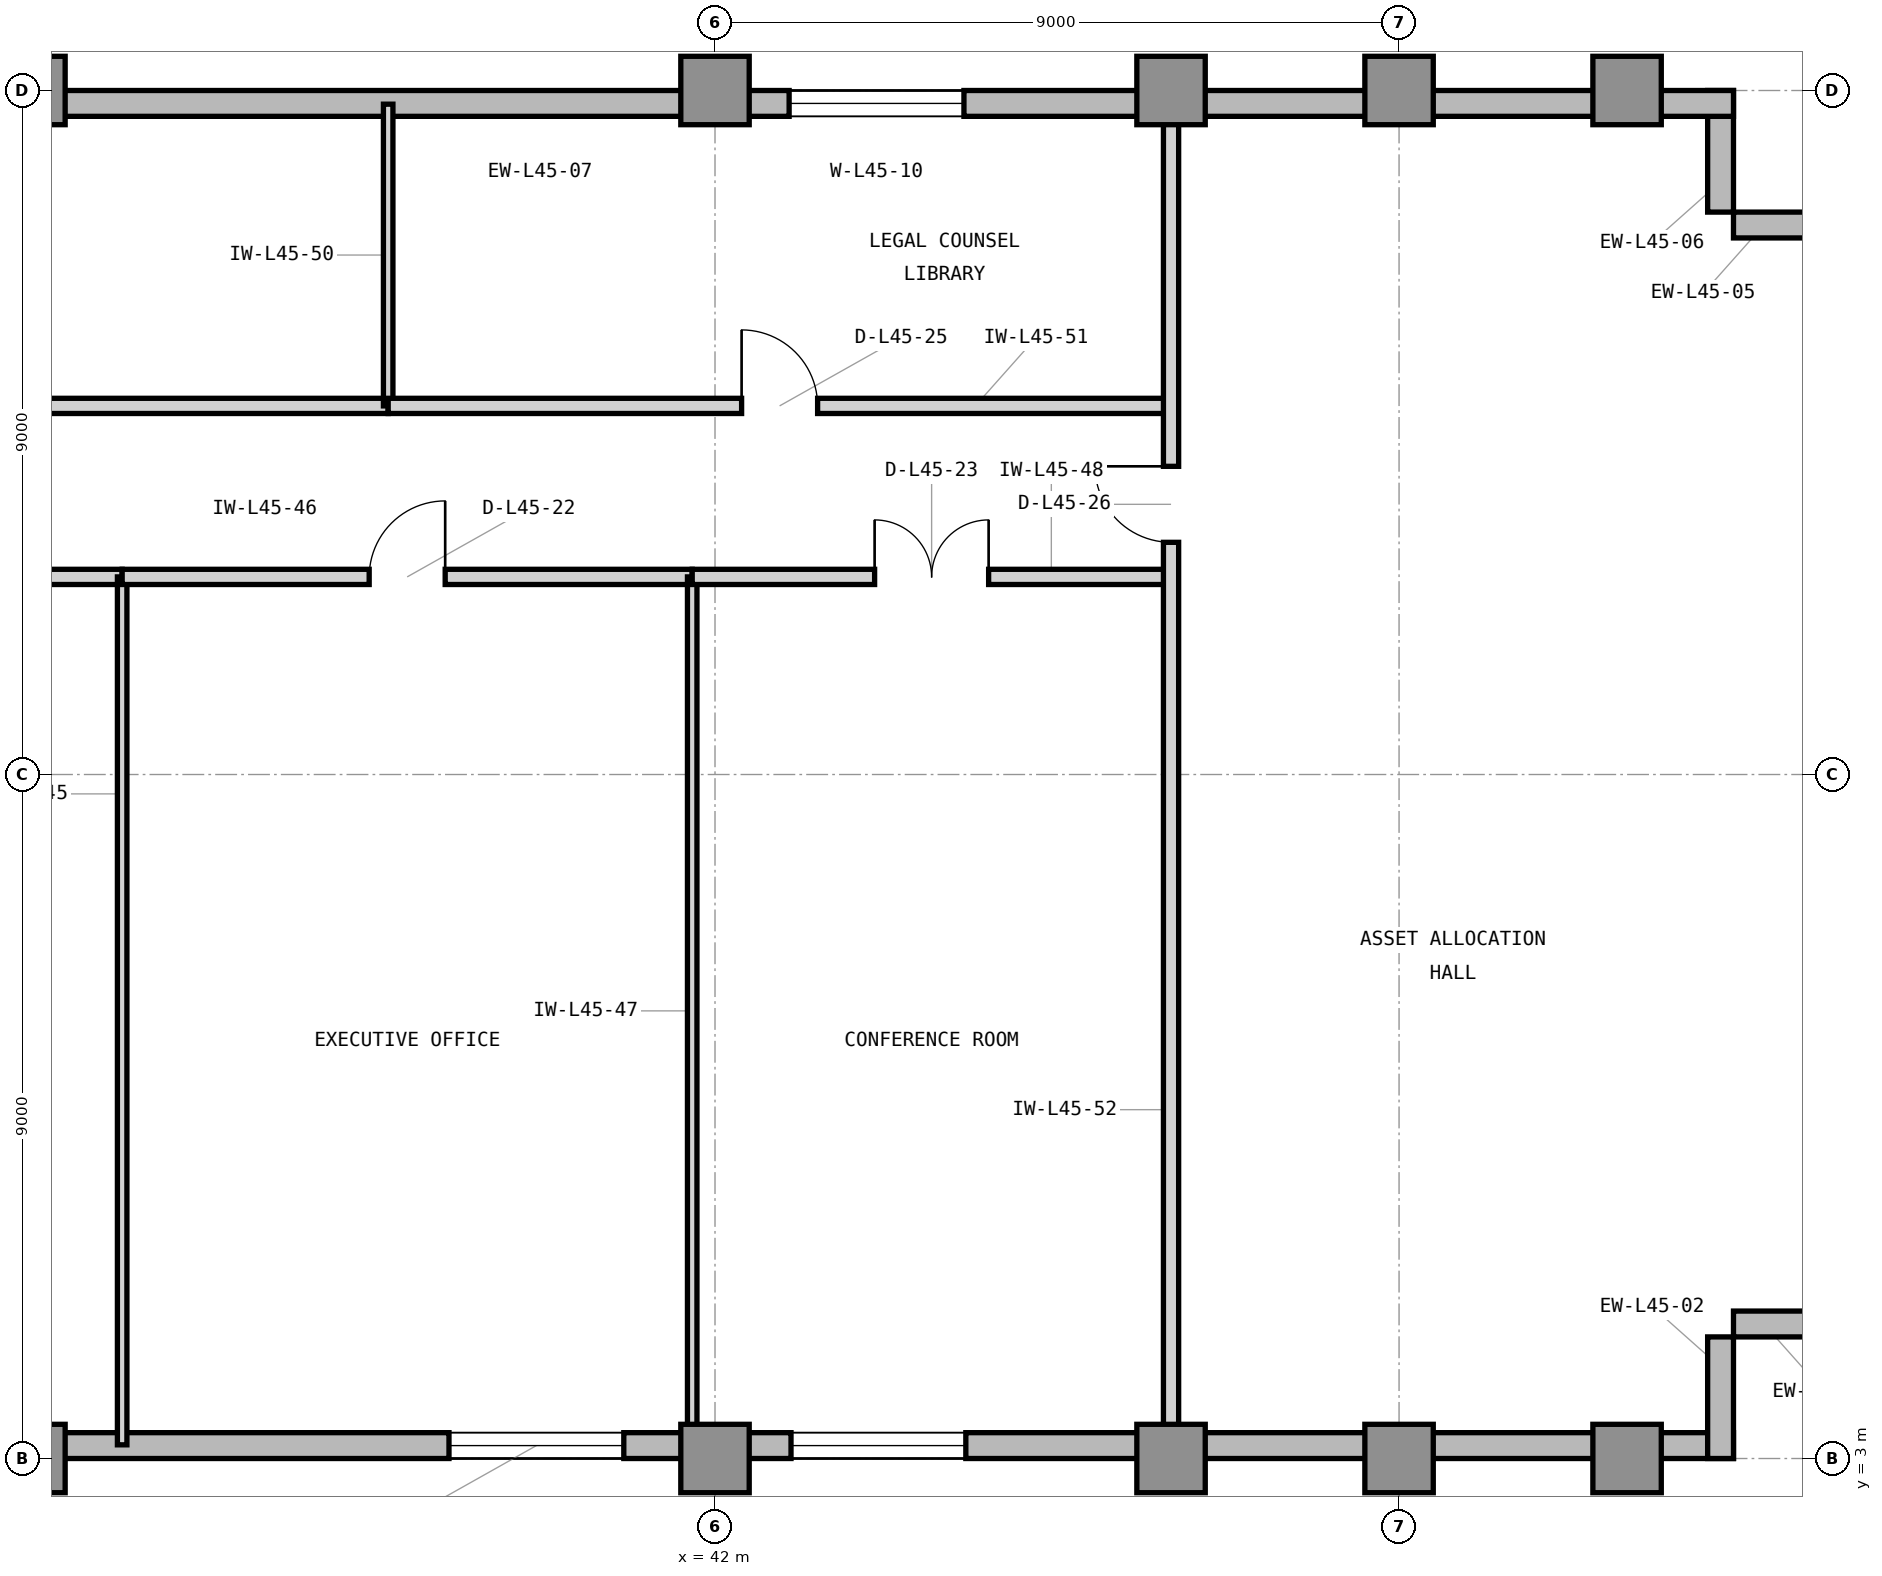
"""IFC4 building model, lengths in metres.
Left out: names, types, materials, properties, quantities, classifications, styles, units other than length and angle.
Written with IfcOpenShell. Run it as: python <this file> out.ifc"""

import sys

from ifc_helpers import new_model, si_unit, direction, frame, frame_2d, origin, origin_2d, place, context, subcontext, project, spatial, rectangle, extrude, element, fill, save


model = new_model("IFC4")
c1 = context("Model", 3, precision=1e-05, world=origin(), true_north=direction((0.0, 1.0)))
c2 = subcontext(c1, "Body", "Model", "MODEL_VIEW")
j1 = project(units=[si_unit("LENGTHUNIT", "METRE"), si_unit("PLANEANGLEUNIT", "RADIAN")], contexts=[c1])
p1 = place(None, origin())
s1 = spatial("IfcSite", under=j1, at=p1, CompositionType="ELEMENT")
p2 = place(p1, origin())
s2 = spatial("IfcBuilding", under=s1, at=p2, CompositionType="ELEMENT")
p3 = place(p2, frame((0.0, 0.0, 187.8)))
s3 = spatial("IfcBuildingStorey", under=s2, at=p3, CompositionType="ELEMENT", Elevation=187.8)
for number, where, z_axis, x_axis in (
    (1, (33.0, 3.0, 0.0), (0.0, 0.0, 1.0), (1.0, 0.0, 0.0)),
    (2, (33.0, 21.0, 0.0), (0.0, 0.0, 1.0), (1.0, 0.0, 0.0)),
    (3, (42.0, 3.0, 0.0), (0.0, 0.0, 1.0), (1.0, 0.0, 0.0)),
    (4, (42.0, 21.0, 0.0), (0.0, 0.0, 1.0), (1.0, 0.0, 0.0)),
    (5, (48.0, 3.0, 0.0), (0.0, 0.0, 1.0), (1.0, 0.0, 0.0)),
    (6, (48.0, 21.0, 0.0), (0.0, 0.0, 1.0), (1.0, 0.0, 0.0)),
    (7, (51.0, 3.0, 0.0), (0.0, 0.0, 1.0), (1.0, 0.0, 0.0)),
    (8, (51.0, 21.0, 0.0), (0.0, 0.0, 1.0), (1.0, 0.0, 0.0)),
    (9, (54.0, 3.0, 0.0), (0.0, 0.0, 1.0), (1.0, 0.0, 0.0)),
    (10, (54.0, 21.0, 0.0), (0.0, 0.0, 1.0), (1.0, 0.0, 0.0)),
):
    element("IfcColumn", number, at=place(p3, frame(where, z_axis=z_axis, x_axis=x_axis)), inside=s3, PredefinedType="COLUMN", context=c2, shape_type="SweptSolid", body=[
        extrude(rectangle(XDim=0.9, YDim=0.9, at=origin_2d()), origin(), (0.0, 0.0, 1.0), 3.9),
    ])
p4 = place(p3, frame((23.9, 3.17, 0.0), z_axis=(0.0, 0.0, 1.0), x_axis=(1.0, 0.0, 0.0)))
e11 = element("IfcWall", 11, at=p4, inside=s3, PredefinedType="STANDARD", context=c2, shape_type="SweptSolid", body=[
    extrude(rectangle(XDim=31.5, YDim=0.34, at=frame_2d((15.75, 0.0))), origin(), (0.0, 0.0, 1.0), 3.7),
])
p5 = place(p4, frame((5.6, 0.0, 0.9)))
e12 = element("IfcOpeningElement", 12, at=p5, cuts=e11, PredefinedType="OPENING", context=c2, shape_type="SweptSolid", body=[
    extrude(rectangle(XDim=2.3, YDim=2.2, at=frame_2d((1.15, 1.1))), frame((0.0, 0.18, 0.0), z_axis=(0.0, -1.0, 0.0), x_axis=(1.0, 0.0, 0.0)), (0.0, 0.0, 1.0), 0.36),
])
p6 = place(p4, frame((14.6, 0.0, 0.9)))
e13 = element("IfcOpeningElement", 13, at=p6, cuts=e11, PredefinedType="OPENING", context=c2, shape_type="SweptSolid", body=[
    extrude(rectangle(XDim=2.3, YDim=2.2, at=frame_2d((1.15, 1.1))), frame((0.0, 0.18, 0.0), z_axis=(0.0, -1.0, 0.0), x_axis=(1.0, 0.0, 0.0)), (0.0, 0.0, 1.0), 0.36),
])
p7 = place(p4, frame((19.1, 0.0, 0.9)))
e14 = element("IfcOpeningElement", 14, at=p7, cuts=e11, PredefinedType="OPENING", context=c2, shape_type="SweptSolid", body=[
    extrude(rectangle(XDim=2.3, YDim=2.2, at=frame_2d((1.15, 1.1))), frame((0.0, 0.18, 0.0), z_axis=(0.0, -1.0, 0.0), x_axis=(1.0, 0.0, 0.0)), (0.0, 0.0, 1.0), 0.36),
])
p8 = place(p4, frame((0.9, 0.0, 0.9)))
e15 = element("IfcOpeningElement", 15, at=p8, cuts=e11, PredefinedType="OPENING", context=c2, shape_type="SweptSolid", body=[
    extrude(rectangle(XDim=1.6, YDim=2.2, at=frame_2d((0.8, 1.1))), frame((0.0, 0.18, 0.0), z_axis=(0.0, -1.0, 0.0), x_axis=(1.0, 0.0, 0.0)), (0.0, 0.0, 1.0), 0.36),
])
for number, where, z_axis, x_axis in (
    (16, (55.23, 3.0, 0.0), (0.0, 0.0, 1.0), (0.0, 1.0, 0.0)),
    (17, (55.4, 4.77, 0.0), (0.0, 0.0, 1.0), (1.0, 0.0, 0.0)),
    (18, (57.0, 19.23, 0.0), (0.0, 0.0, 1.0), (-1.0, 0.0, 0.0)),
    (19, (55.23, 19.4, 0.0), (0.0, 0.0, 1.0), (0.0, 1.0, 0.0)),
):
    element("IfcWall", number, at=place(p3, frame(where, z_axis=z_axis, x_axis=x_axis)), inside=s3, PredefinedType="STANDARD", context=c2, shape_type="SweptSolid", body=[
        extrude(rectangle(XDim=1.6, YDim=0.34, at=frame_2d((0.8, 0.0))), origin(), (0.0, 0.0, 1.0), 3.7),
    ])
p9 = place(p3, frame((55.4, 20.83, 0.0), z_axis=(0.0, 0.0, 1.0), x_axis=(-1.0, 0.0, 0.0)))
e20 = element("IfcWall", 20, at=p9, inside=s3, PredefinedType="STANDARD", context=c2, shape_type="SweptSolid", body=[
    extrude(rectangle(XDim=31.4, YDim=0.34, at=frame_2d((15.7, 0.0))), origin(), (0.0, 0.0, 1.0), 3.7),
])
p10 = place(p9, frame((29.046, 0.0, 0.9)))
e21 = element("IfcOpeningElement", 21, at=p10, cuts=e20, PredefinedType="OPENING", context=c2, shape_type="SweptSolid", body=[
    extrude(rectangle(XDim=1.6, YDim=2.2, at=frame_2d((0.8, 1.1))), frame((0.0, 0.18, 0.0), z_axis=(0.0, -1.0, 0.0), x_axis=(1.0, 0.0, 0.0)), (0.0, 0.0, 1.0), 0.36),
])
p11 = place(p9, frame((10.125, 0.0, 0.9)))
e22 = element("IfcOpeningElement", 22, at=p11, cuts=e20, PredefinedType="OPENING", context=c2, shape_type="SweptSolid", body=[
    extrude(rectangle(XDim=2.3, YDim=2.2, at=frame_2d((1.15, 1.1))), frame((0.0, 0.18, 0.0), z_axis=(0.0, -1.0, 0.0), x_axis=(1.0, 0.0, 0.0)), (0.0, 0.0, 1.0), 0.36),
])
p12 = place(p3, frame((26.7, 14.6, 0.0), z_axis=(0.0, 0.0, 1.0), x_axis=(1.0, 0.0, 0.0)))
e23 = element("IfcWall", 23, at=p12, inside=s3, PredefinedType="PARTITIONING", context=c2, shape_type="SweptSolid", body=[
    extrude(rectangle(XDim=7.5, YDim=0.2, at=frame_2d((3.75, 0.0))), origin(), (0.0, 0.0, 1.0), 3.69),
])
p13 = place(p12, frame((2.75, 0.0, 0.0)))
e24 = element("IfcOpeningElement", 24, at=p13, cuts=e23, PredefinedType="OPENING", context=c2, shape_type="SweptSolid", body=[
    extrude(rectangle(XDim=2.0, YDim=2.5, at=frame_2d((1.0, 1.25))), frame((0.0, 0.11, 0.0), z_axis=(0.0, -1.0, 0.0), x_axis=(1.0, 0.0, 0.0)), (0.0, 0.0, 1.0), 0.22),
])
p14 = place(p3, frame((34.2, 3.18, 0.0), z_axis=(0.0, 0.0, 1.0), x_axis=(0.0, 1.0, 0.0)))
e25 = element("IfcWall", 25, at=p14, inside=s3, PredefinedType="PARTITIONING", context=c2, shape_type="SweptSolid", body=[
    extrude(rectangle(XDim=11.42, YDim=0.125, at=frame_2d((5.71, 0.0))), origin(), (0.0, 0.0, 1.0), 3.69),
])
p15 = place(p3, frame((34.2, 14.6, 0.0), z_axis=(0.0, 0.0, 1.0), x_axis=(1.0, 0.0, 0.0)))
e26 = element("IfcWall", 26, at=p15, inside=s3, PredefinedType="PARTITIONING", context=c2, shape_type="SweptSolid", body=[
    extrude(rectangle(XDim=7.5, YDim=0.2, at=frame_2d((3.75, 0.0))), origin(), (0.0, 0.0, 1.0), 3.69),
])
p16 = place(p15, frame((3.25, 0.0, 0.0)))
e27 = element("IfcOpeningElement", 27, at=p16, cuts=e26, PredefinedType="OPENING", context=c2, shape_type="SweptSolid", body=[
    extrude(rectangle(XDim=1.0, YDim=2.15, at=frame_2d((0.5, 1.075))), frame((0.0, 0.11, 0.0), z_axis=(0.0, -1.0, 0.0), x_axis=(1.0, 0.0, 0.0)), (0.0, 0.0, 1.0), 0.22),
])
p17 = place(p3, frame((41.7, 3.18, 0.0), z_axis=(0.0, 0.0, 1.0), x_axis=(0.0, 1.0, 0.0)))
e28 = element("IfcWall", 28, at=p17, inside=s3, PredefinedType="PARTITIONING", context=c2, shape_type="SweptSolid", body=[
    extrude(rectangle(XDim=11.42, YDim=0.125, at=frame_2d((5.71, 0.0))), origin(), (0.0, 0.0, 1.0), 3.69),
])
p18 = place(p3, frame((41.7, 14.6, 0.0), z_axis=(0.0, 0.0, 1.0), x_axis=(1.0, 0.0, 0.0)))
e29 = element("IfcWall", 29, at=p18, inside=s3, PredefinedType="PARTITIONING", context=c2, shape_type="SweptSolid", body=[
    extrude(rectangle(XDim=6.3, YDim=0.2, at=frame_2d((3.15, 0.0))), origin(), (0.0, 0.0, 1.0), 3.69),
])
p19 = place(p18, frame((2.4, 0.0, 0.0)))
e30 = element("IfcOpeningElement", 30, at=p19, cuts=e29, PredefinedType="OPENING", context=c2, shape_type="SweptSolid", body=[
    extrude(rectangle(XDim=1.5, YDim=2.3, at=frame_2d((0.75, 1.15))), frame((0.0, 0.11, 0.0), z_axis=(0.0, -1.0, 0.0), x_axis=(1.0, 0.0, 0.0)), (0.0, 0.0, 1.0), 0.22),
])
p20 = place(p3, frame((26.7, 16.85, 0.0), z_axis=(0.0, 0.0, 1.0), x_axis=(1.0, 0.0, 0.0)))
e31 = element("IfcWall", 31, at=p20, inside=s3, PredefinedType="PARTITIONING", context=c2, shape_type="SweptSolid", body=[
    extrude(rectangle(XDim=11.0, YDim=0.2, at=frame_2d((5.5, 0.0))), origin(), (0.0, 0.0, 1.0), 3.69),
])
p21 = place(p20, frame((4.75, 0.0, 0.0)))
e32 = element("IfcOpeningElement", 32, at=p21, cuts=e31, PredefinedType="OPENING", context=c2, shape_type="SweptSolid", body=[
    extrude(rectangle(XDim=1.5, YDim=2.3, at=frame_2d((0.75, 1.15))), frame((0.0, 0.11, 0.0), z_axis=(0.0, -1.0, 0.0), x_axis=(1.0, 0.0, 0.0)), (0.0, 0.0, 1.0), 0.22),
])
p22 = place(p3, frame((37.7, 16.85, 0.0), z_axis=(0.0, 0.0, 1.0), x_axis=(0.0, 1.0, 0.0)))
e33 = element("IfcWall", 33, at=p22, inside=s3, PredefinedType="PARTITIONING", context=c2, shape_type="SweptSolid", body=[
    extrude(rectangle(XDim=3.97, YDim=0.125, at=frame_2d((1.985, 0.0))), origin(), (0.0, 0.0, 1.0), 3.69),
])
p23 = place(p3, frame((37.7, 16.85, 0.0), z_axis=(0.0, 0.0, 1.0), x_axis=(1.0, 0.0, 0.0)))
e34 = element("IfcWall", 34, at=p23, inside=s3, PredefinedType="PARTITIONING", context=c2, shape_type="SweptSolid", body=[
    extrude(rectangle(XDim=10.3, YDim=0.2, at=frame_2d((5.15, 0.0))), origin(), (0.0, 0.0, 1.0), 3.69),
])
p24 = place(p23, frame((4.65, 0.0, 0.0)))
e35 = element("IfcOpeningElement", 35, at=p24, cuts=e34, PredefinedType="OPENING", context=c2, shape_type="SweptSolid", body=[
    extrude(rectangle(XDim=1.0, YDim=2.15, at=frame_2d((0.5, 1.075))), frame((0.0, 0.11, 0.0), z_axis=(0.0, -1.0, 0.0), x_axis=(1.0, 0.0, 0.0)), (0.0, 0.0, 1.0), 0.22),
])
p25 = place(p3, frame((48.0, 3.18, 0.0), z_axis=(0.0, 0.0, 1.0), x_axis=(0.0, 1.0, 0.0)))
e36 = element("IfcWall", 36, at=p25, inside=s3, PredefinedType="PARTITIONING", context=c2, shape_type="SweptSolid", body=[
    extrude(rectangle(XDim=17.64, YDim=0.2, at=frame_2d((8.82, 0.0))), origin(), (0.0, 0.0, 1.0), 3.073),
])
p26 = place(p25, frame((11.875, 0.0, 0.0)))
e37 = element("IfcOpeningElement", 37, at=p26, cuts=e36, PredefinedType="OPENING", context=c2, shape_type="SweptSolid", body=[
    extrude(rectangle(XDim=1.0, YDim=2.15, at=frame_2d((0.5, 1.075))), frame((0.0, 0.11, 0.0), z_axis=(0.0, -1.0, 0.0), x_axis=(1.0, 0.0, 0.0)), (0.0, 0.0, 1.0), 0.22),
])
p27 = place(p6, origin())
e38 = element("IfcWindow", 38, at=p27, inside=s3, PartitioningType="SINGLE_PANEL", PredefinedType="WINDOW", context=c2, shape_type="SweptSolid", body=[
    extrude(rectangle(XDim=2.3, YDim=2.2, at=frame_2d((1.15, 1.1))), frame((0.0, 0.11, 0.0), z_axis=(0.0, -1.0, 0.0), x_axis=(1.0, 0.0, 0.0)), (0.0, 0.0, 1.0), 0.06),
])
fill(e13, e38)
p28 = place(p7, origin())
e39 = element("IfcWindow", 39, at=p28, inside=s3, PartitioningType="SINGLE_PANEL", PredefinedType="WINDOW", context=c2, shape_type="SweptSolid", body=[
    extrude(rectangle(XDim=2.3, YDim=2.2, at=frame_2d((1.15, 1.1))), frame((0.0, 0.11, 0.0), z_axis=(0.0, -1.0, 0.0), x_axis=(1.0, 0.0, 0.0)), (0.0, 0.0, 1.0), 0.06),
])
fill(e14, e39)
p29 = place(p16, origin())
e40 = element("IfcDoor", 40, at=p29, inside=s3, OperationType="SINGLE_SWING_RIGHT", PredefinedType="DOOR", context=c2, shape_type="SweptSolid", body=[
    extrude(rectangle(XDim=1.0, YDim=2.15, at=frame_2d((0.5, 1.075))), frame((0.0, 0.025, 0.0), z_axis=(0.0, -1.0, 0.0), x_axis=(1.0, 0.0, 0.0)), (0.0, 0.0, 1.0), 0.05),
])
fill(e27, e40)
p30 = place(p19, origin())
e41 = element("IfcDoor", 41, at=p30, inside=s3, OperationType="DOUBLE_DOOR_SINGLE_SWING", PredefinedType="DOOR", context=c2, shape_type="SweptSolid", body=[
    extrude(rectangle(XDim=1.5, YDim=2.3, at=frame_2d((0.75, 1.15))), frame((0.0, 0.025, 0.0), z_axis=(0.0, -1.0, 0.0), x_axis=(1.0, 0.0, 0.0)), (0.0, 0.0, 1.0), 0.05),
])
fill(e30, e41)
p31 = place(p24, origin())
e42 = element("IfcDoor", 42, at=p31, inside=s3, OperationType="SINGLE_SWING_LEFT", PredefinedType="DOOR", context=c2, shape_type="SweptSolid", body=[
    extrude(rectangle(XDim=1.0, YDim=2.15, at=frame_2d((0.5, 1.075))), frame((0.0, 0.025, 0.0), z_axis=(0.0, -1.0, 0.0), x_axis=(1.0, 0.0, 0.0)), (0.0, 0.0, 1.0), 0.05),
])
fill(e35, e42)
p32 = place(p26, origin())
e43 = element("IfcDoor", 43, at=p32, inside=s3, OperationType="SINGLE_SWING_RIGHT", PredefinedType="DOOR", context=c2, shape_type="SweptSolid", body=[
    extrude(rectangle(XDim=1.0, YDim=2.15, at=frame_2d((0.5, 1.075))), frame((0.0, 0.025, 0.0), z_axis=(0.0, -1.0, 0.0), x_axis=(1.0, 0.0, 0.0)), (0.0, 0.0, 1.0), 0.05),
])
fill(e37, e43)
p33 = place(p11, origin())
e44 = element("IfcWindow", 44, at=p33, inside=s3, PartitioningType="SINGLE_PANEL", PredefinedType="WINDOW", context=c2, shape_type="SweptSolid", body=[
    extrude(rectangle(XDim=2.3, YDim=2.2, at=frame_2d((1.15, 1.1))), frame((0.0, 0.11, 0.0), z_axis=(0.0, -1.0, 0.0), x_axis=(1.0, 0.0, 0.0)), (0.0, 0.0, 1.0), 0.06),
])
fill(e22, e44)
save(model, sys.argv[1])
